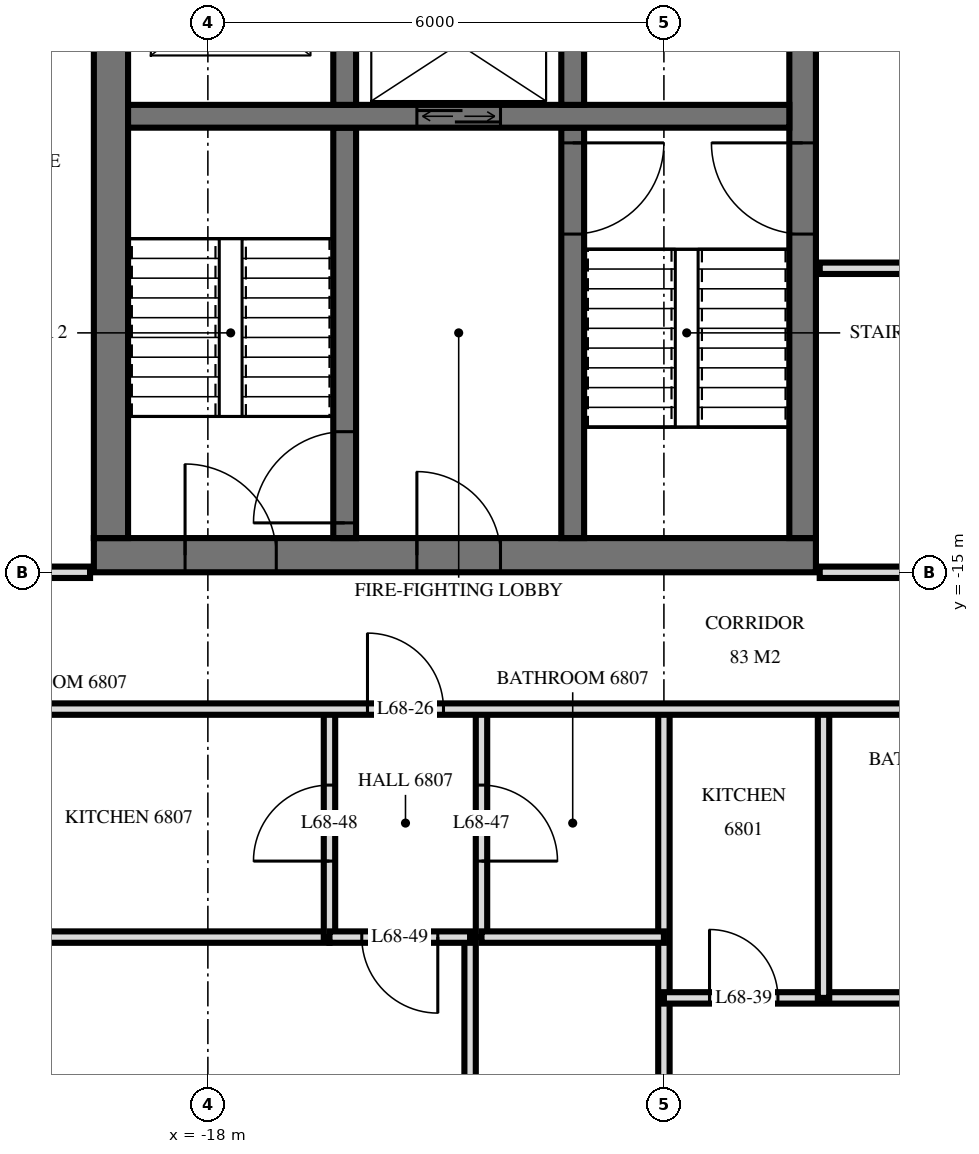
"""IFC4 building model, lengths in metres.
Left out: names, types, materials, properties, quantities, classifications, styles, units other than length and angle.
Written with IfcOpenShell. Run it as: python <this file> out.ifc"""

import sys

from ifc_helpers import new_model, si_unit, direction, frame, frame_2d, origin, place, context, subcontext, project, spatial, rectangle, extrude, element, fill, save


model = new_model("IFC4")
c1 = context("Model", 3, precision=1e-05, world=origin(), true_north=direction((0.0, 1.0)))
c2 = subcontext(c1, "Body", "Model", "MODEL_VIEW")
j1 = project(units=[si_unit("LENGTHUNIT", "METRE"), si_unit("PLANEANGLEUNIT", "RADIAN")], contexts=[c1])
p1 = place(None, origin())
s1 = spatial("IfcSite", under=j1, at=p1, CompositionType="ELEMENT")
p2 = place(p1, origin())
s2 = spatial("IfcBuilding", under=s1, at=p2, CompositionType="ELEMENT")
p3 = place(p2, frame((0.0, 0.0, 259.6)))
s3 = spatial("IfcBuildingStorey", under=s2, at=p3, CompositionType="ELEMENT", Elevation=259.6)
p4 = place(p3, frame((-19.5, -14.775, 0.0), z_axis=(0.0, 0.0, 1.0), x_axis=(1.0, 0.0, 0.0)))
e1 = element("IfcWall", 1, at=p4, inside=s3, PredefinedType="SHEAR", context=c2, shape_type="SweptSolid", body=[
    extrude(rectangle(XDim=9.5, YDim=0.45, at=frame_2d((4.75, 0.0))), origin(), (0.0, 0.0, 1.0), 3.5),
])
p5 = place(p4, frame((1.2, 0.0, 0.0)))
e2 = element("IfcOpeningElement", 2, at=p5, cuts=e1, PredefinedType="OPENING", context=c2, shape_type="SweptSolid", body=[
    extrude(rectangle(XDim=1.2, YDim=2.1, at=frame_2d((0.6, 1.05))), frame((0.0, 0.235, 0.0), z_axis=(0.0, -1.0, 0.0), x_axis=(1.0, 0.0, 0.0)), (0.0, 0.0, 1.0), 0.47),
])
p6 = place(p4, frame((4.25, 0.0, 0.0)))
e3 = element("IfcOpeningElement", 3, at=p6, cuts=e1, PredefinedType="OPENING", context=c2, shape_type="SweptSolid", body=[
    extrude(rectangle(XDim=1.1, YDim=2.1, at=frame_2d((0.55, 1.05))), frame((0.0, 0.235, 0.0), z_axis=(0.0, -1.0, 0.0), x_axis=(1.0, 0.0, 0.0)), (0.0, 0.0, 1.0), 0.47),
])
p7 = place(p3, frame((-10.175, -14.55, 0.0), z_axis=(0.0, 0.0, 1.0), x_axis=(0.0, 1.0, 0.0)))
e4 = element("IfcWall", 4, at=p7, inside=s3, PredefinedType="SHEAR", context=c2, shape_type="SweptSolid", body=[
    extrude(rectangle(XDim=14.1, YDim=0.35, at=frame_2d((7.05, 0.0))), origin(), (0.0, 0.0, 1.0), 3.5),
])
p8 = place(p7, frame((8.4, 0.0, 0.0)))
e5 = element("IfcOpeningElement", 5, at=p8, cuts=e4, PredefinedType="OPENING", context=c2, shape_type="SweptSolid", body=[
    extrude(rectangle(XDim=1.4, YDim=2.4, at=frame_2d((0.7, 1.2))), frame((0.0, 0.185, 0.0), z_axis=(0.0, -1.0, 0.0), x_axis=(1.0, 0.0, 0.0)), (0.0, 0.0, 1.0), 0.37),
])
p9 = place(p7, frame((10.0, 0.0, 0.0)))
e6 = element("IfcOpeningElement", 6, at=p9, cuts=e4, PredefinedType="OPENING", context=c2, shape_type="SweptSolid", body=[
    extrude(rectangle(XDim=1.4, YDim=2.4, at=frame_2d((0.7, 1.2))), frame((0.0, 0.185, 0.0), z_axis=(0.0, -1.0, 0.0), x_axis=(1.0, 0.0, 0.0)), (0.0, 0.0, 1.0), 0.37),
])
p10 = place(p7, frame((4.0, 0.0, 0.0)))
e7 = element("IfcOpeningElement", 7, at=p10, cuts=e4, PredefinedType="OPENING", context=c2, shape_type="SweptSolid", body=[
    extrude(rectangle(XDim=1.2, YDim=2.1, at=frame_2d((0.6, 1.05))), frame((0.0, 0.185, 0.0), z_axis=(0.0, -1.0, 0.0), x_axis=(1.0, 0.0, 0.0)), (0.0, 0.0, 1.0), 0.37),
])
p11 = place(p3, frame((-19.275, -14.55, 0.0), z_axis=(0.0, 0.0, 1.0), x_axis=(0.0, 1.0, 0.0)))
e8 = element("IfcWall", 8, at=p11, inside=s3, PredefinedType="SHEAR", context=c2, shape_type="SweptSolid", body=[
    extrude(rectangle(XDim=14.1, YDim=0.45, at=frame_2d((7.05, 0.0))), origin(), (0.0, 0.0, 1.0), 3.5),
])
p12 = place(p3, frame((-19.05, -9.0, 0.0), z_axis=(0.0, 0.0, 1.0), x_axis=(1.0, 0.0, 0.0)))
e9 = element("IfcWall", 9, at=p12, inside=s3, PredefinedType="SHEAR", context=c2, shape_type="SweptSolid", body=[
    extrude(rectangle(XDim=8.7, YDim=0.3, at=frame_2d((4.35, 0.0))), origin(), (0.0, 0.0, 1.0), 3.5),
])
p13 = place(p12, frame((3.8, 0.0, 0.0)))
e10 = element("IfcOpeningElement", 10, at=p13, cuts=e9, PredefinedType="OPENING", context=c2, shape_type="SweptSolid", body=[
    extrude(rectangle(XDim=1.1, YDim=2.1, at=frame_2d((0.55, 1.05))), frame((0.0, 0.16, 0.0), z_axis=(0.0, -1.0, 0.0), x_axis=(1.0, 0.0, 0.0)), (0.0, 0.0, 1.0), 0.32),
])
p14 = place(p3, frame((-13.2, -8.85, 0.0), z_axis=(0.0, 0.0, 1.0), x_axis=(0.0, 1.0, 0.0)))
e11 = element("IfcWall", 11, at=p14, inside=s3, PredefinedType="SHEAR", context=c2, shape_type="SweptSolid", body=[
    extrude(rectangle(XDim=2.3, YDim=0.3, at=frame_2d((1.15, 0.0))), origin(), (0.0, 0.0, 1.0), 3.5),
])
p15 = place(p3, frame((-13.2, -14.55, 0.0), z_axis=(0.0, 0.0, 1.0), x_axis=(0.0, 1.0, 0.0)))
e12 = element("IfcWall", 12, at=p15, inside=s3, PredefinedType="SHEAR", context=c2, shape_type="SweptSolid", body=[
    extrude(rectangle(XDim=5.4, YDim=0.3, at=frame_2d((2.7, 0.0))), origin(), (0.0, 0.0, 1.0), 3.5),
])
p16 = place(p15, frame((4.0, 0.0, 0.0)))
e13 = element("IfcOpeningElement", 13, at=p16, cuts=e12, PredefinedType="OPENING", context=c2, shape_type="SweptSolid", body=[
    extrude(rectangle(XDim=1.2, YDim=2.1, at=frame_2d((0.6, 1.05))), frame((0.0, 0.16, 0.0), z_axis=(0.0, -1.0, 0.0), x_axis=(1.0, 0.0, 0.0)), (0.0, 0.0, 1.0), 0.32),
])
p17 = place(p3, frame((-16.2, -8.85, 0.0), z_axis=(0.0, 0.0, 1.0), x_axis=(0.0, 1.0, 0.0)))
e14 = element("IfcWall", 14, at=p17, inside=s3, PredefinedType="SHEAR", context=c2, shape_type="SweptSolid", body=[
    extrude(rectangle(XDim=2.3, YDim=0.3, at=frame_2d((1.15, 0.0))), origin(), (0.0, 0.0, 1.0), 3.5),
])
p18 = place(p3, frame((-16.2, -14.55, 0.0), z_axis=(0.0, 0.0, 1.0), x_axis=(0.0, 1.0, 0.0)))
e15 = element("IfcWall", 15, at=p18, inside=s3, PredefinedType="SHEAR", context=c2, shape_type="SweptSolid", body=[
    extrude(rectangle(XDim=5.4, YDim=0.3, at=frame_2d((2.7, 0.0))), origin(), (0.0, 0.0, 1.0), 3.5),
])
p19 = place(p18, frame((0.2, 0.0, 0.0)))
e16 = element("IfcOpeningElement", 16, at=p19, cuts=e15, PredefinedType="OPENING", context=c2, shape_type="SweptSolid", body=[
    extrude(rectangle(XDim=1.2, YDim=2.1, at=frame_2d((0.6, 1.05))), frame((0.0, 0.16, 0.0), z_axis=(0.0, -1.0, 0.0), x_axis=(1.0, 0.0, 0.0)), (0.0, 0.0, 1.0), 0.32),
])
p20 = place(p3, frame((-9.9, -20.6, 0.0), z_axis=(0.0, 0.0, 1.0), x_axis=(0.0, 1.0, 0.0)))
e17 = element("IfcWall", 17, at=p20, inside=s3, PredefinedType="PARTITIONING", context=c2, shape_type="SweptSolid", body=[
    extrude(rectangle(XDim=3.8, YDim=0.15, at=frame_2d((1.9, 0.0))), origin(), (0.0, 0.0, 1.0), 3.22),
])
p21 = place(p3, frame((-12.0, -33.62, 0.0), z_axis=(0.0, 0.0, 1.0), x_axis=(0.0, 1.0, 0.0)))
e18 = element("IfcWall", 18, at=p21, inside=s3, PredefinedType="PARTITIONING", context=c2, shape_type="SweptSolid", body=[
    extrude(rectangle(XDim=16.82, YDim=0.15, at=frame_2d((8.41, 0.0))), origin(), (0.0, 0.0, 1.0), 3.22),
])
p22 = place(p3, frame((-14.4, -19.8, 0.0), z_axis=(0.0, 0.0, 1.0), x_axis=(0.0, 1.0, 0.0)))
e19 = element("IfcWall", 19, at=p22, inside=s3, PredefinedType="PARTITIONING", context=c2, shape_type="SweptSolid", body=[
    extrude(rectangle(XDim=3.0, YDim=0.15, at=frame_2d((1.5, 0.0))), origin(), (0.0, 0.0, 1.0), 3.22),
])
p23 = place(p22, frame((1.0, 0.0, 0.0)))
e20 = element("IfcOpeningElement", 20, at=p23, cuts=e19, PredefinedType="OPENING", context=c2, shape_type="SweptSolid", body=[
    extrude(rectangle(XDim=1.0, YDim=2.1, at=frame_2d((0.5, 1.05))), frame((0.0, 0.085, 0.0), z_axis=(0.0, -1.0, 0.0), x_axis=(1.0, 0.0, 0.0)), (0.0, 0.0, 1.0), 0.17),
])
p24 = place(p3, frame((-14.55, -33.62, 0.0), z_axis=(0.0, 0.0, 1.0), x_axis=(0.0, 1.0, 0.0)))
e21 = element("IfcWall", 21, at=p24, inside=s3, PredefinedType="PARTITIONING", context=c2, shape_type="SweptSolid", body=[
    extrude(rectangle(XDim=13.82, YDim=0.15, at=frame_2d((6.91, 0.0))), origin(), (0.0, 0.0, 1.0), 3.22),
])
p25 = place(p24, frame((6.37, 0.0, 0.0)))
e22 = element("IfcOpeningElement", 22, at=p25, cuts=e21, PredefinedType="OPENING", context=c2, shape_type="SweptSolid", body=[
    extrude(rectangle(XDim=0.9, YDim=2.1, at=frame_2d((0.45, 1.05))), frame((0.0, 0.085, 0.0), z_axis=(0.0, -1.0, 0.0), x_axis=(1.0, 0.0, 0.0)), (0.0, 0.0, 1.0), 0.17),
])
p26 = place(p3, frame((-16.4, -19.8, 0.0), z_axis=(0.0, 0.0, 1.0), x_axis=(0.0, 1.0, 0.0)))
e23 = element("IfcWall", 23, at=p26, inside=s3, PredefinedType="PARTITIONING", context=c2, shape_type="SweptSolid", body=[
    extrude(rectangle(XDim=3.0, YDim=0.15, at=frame_2d((1.5, 0.0))), origin(), (0.0, 0.0, 1.0), 3.22),
])
p27 = place(p26, frame((1.0, 0.0, 0.0)))
e24 = element("IfcOpeningElement", 24, at=p27, cuts=e23, PredefinedType="OPENING", context=c2, shape_type="SweptSolid", body=[
    extrude(rectangle(XDim=1.0, YDim=2.1, at=frame_2d((0.5, 1.05))), frame((0.0, 0.085, 0.0), z_axis=(0.0, -1.0, 0.0), x_axis=(1.0, 0.0, 0.0)), (0.0, 0.0, 1.0), 0.17),
])
p28 = place(p3, frame((-12.0, -20.6, 0.0), z_axis=(0.0, 0.0, 1.0), x_axis=(1.0, 0.0, 0.0)))
e25 = element("IfcWall", 25, at=p28, inside=s3, PredefinedType="PARTITIONING", context=c2, shape_type="SweptSolid", body=[
    extrude(rectangle(XDim=4.5, YDim=0.15, at=frame_2d((2.25, 0.0))), origin(), (0.0, 0.0, 1.0), 3.22),
])
p29 = place(p28, frame((0.6, 0.0, 0.0)))
e26 = element("IfcOpeningElement", 26, at=p29, cuts=e25, PredefinedType="OPENING", context=c2, shape_type="SweptSolid", body=[
    extrude(rectangle(XDim=0.9, YDim=2.1, at=frame_2d((0.45, 1.05))), frame((0.0, 0.085, 0.0), z_axis=(0.0, -1.0, 0.0), x_axis=(1.0, 0.0, 0.0)), (0.0, 0.0, 1.0), 0.17),
])
p30 = place(p3, frame((-16.4, -19.8, 0.0), z_axis=(0.0, 0.0, 1.0), x_axis=(1.0, 0.0, 0.0)))
e27 = element("IfcWall", 27, at=p30, inside=s3, PredefinedType="PARTITIONING", context=c2, shape_type="SweptSolid", body=[
    extrude(rectangle(XDim=1.85, YDim=0.15, at=frame_2d((0.925, 0.0))), origin(), (0.0, 0.0, 1.0), 3.22),
])
p31 = place(p30, frame((0.425, 0.0, 0.0)))
e28 = element("IfcOpeningElement", 28, at=p31, cuts=e27, PredefinedType="OPENING", context=c2, shape_type="SweptSolid", body=[
    extrude(rectangle(XDim=1.0, YDim=2.1, at=frame_2d((0.5, 1.05))), frame((0.0, 0.085, 0.0), z_axis=(0.0, -1.0, 0.0), x_axis=(1.0, 0.0, 0.0)), (0.0, 0.0, 1.0), 0.17),
])
p32 = place(p3, frame((-20.55, -19.8, 0.0), z_axis=(0.0, 0.0, 1.0), x_axis=(1.0, 0.0, 0.0)))
e29 = element("IfcWall", 29, at=p32, inside=s3, PredefinedType="PARTITIONING", context=c2, shape_type="SweptSolid", body=[
    extrude(rectangle(XDim=4.15, YDim=0.15, at=frame_2d((2.075, 0.0))), origin(), (0.0, 0.0, 1.0), 3.22),
])
p33 = place(p3, frame((-14.4, -19.8, 0.0), z_axis=(0.0, 0.0, 1.0), x_axis=(1.0, 0.0, 0.0)))
e30 = element("IfcWall", 30, at=p33, inside=s3, PredefinedType="PARTITIONING", context=c2, shape_type="SweptSolid", body=[
    extrude(rectangle(XDim=2.4, YDim=0.15, at=frame_2d((1.2, 0.0))), origin(), (0.0, 0.0, 1.0), 3.22),
])
p34 = place(p3, frame((-22.92, -16.8, 0.0), z_axis=(0.0, 0.0, 1.0), x_axis=(1.0, 0.0, 0.0)))
e31 = element("IfcWall", 31, at=p34, inside=s3, PredefinedType="PARTITIONING", context=c2, shape_type="SweptSolid", body=[
    extrude(rectangle(XDim=45.84, YDim=0.15, at=frame_2d((22.92, 0.0))), origin(), (0.0, 0.0, 1.0), 3.22),
])
p35 = place(p34, frame((15.67, 0.0, 0.0)))
e32 = element("IfcOpeningElement", 32, at=p35, cuts=e31, PredefinedType="OPENING", context=c2, shape_type="SweptSolid", body=[
    extrude(rectangle(XDim=1.0, YDim=2.1, at=frame_2d((0.5, 1.05))), frame((0.0, 0.085, 0.0), z_axis=(0.0, -1.0, 0.0), x_axis=(1.0, 0.0, 0.0)), (0.0, 0.0, 1.0), 0.17),
])
p36 = place(p34, frame((18.77, 0.0, 0.0)))
e33 = element("IfcOpeningElement", 33, at=p36, cuts=e31, PredefinedType="OPENING", context=c2, shape_type="SweptSolid", body=[
    extrude(rectangle(XDim=1.0, YDim=2.1, at=frame_2d((0.5, 1.05))), frame((0.0, 0.085, 0.0), z_axis=(0.0, -1.0, 0.0), x_axis=(1.0, 0.0, 0.0)), (0.0, 0.0, 1.0), 0.17),
])
p37 = place(p34, frame((20.07, 0.0, 0.0)))
e34 = element("IfcOpeningElement", 34, at=p37, cuts=e31, PredefinedType="OPENING", context=c2, shape_type="SweptSolid", body=[
    extrude(rectangle(XDim=1.0, YDim=2.1, at=frame_2d((0.5, 1.05))), frame((0.0, 0.085, 0.0), z_axis=(0.0, -1.0, 0.0), x_axis=(1.0, 0.0, 0.0)), (0.0, 0.0, 1.0), 0.17),
])
p38 = place(p34, frame((24.77, 0.0, 0.0)))
e35 = element("IfcOpeningElement", 35, at=p38, cuts=e31, PredefinedType="OPENING", context=c2, shape_type="SweptSolid", body=[
    extrude(rectangle(XDim=1.0, YDim=2.1, at=frame_2d((0.5, 1.05))), frame((0.0, 0.085, 0.0), z_axis=(0.0, -1.0, 0.0), x_axis=(1.0, 0.0, 0.0)), (0.0, 0.0, 1.0), 0.17),
])
p39 = place(p34, frame((26.07, 0.0, 0.0)))
e36 = element("IfcOpeningElement", 36, at=p39, cuts=e31, PredefinedType="OPENING", context=c2, shape_type="SweptSolid", body=[
    extrude(rectangle(XDim=1.0, YDim=2.1, at=frame_2d((0.5, 1.05))), frame((0.0, 0.085, 0.0), z_axis=(0.0, -1.0, 0.0), x_axis=(1.0, 0.0, 0.0)), (0.0, 0.0, 1.0), 0.17),
])
p40 = place(p34, frame((30.77, 0.0, 0.0)))
e37 = element("IfcOpeningElement", 37, at=p40, cuts=e31, PredefinedType="OPENING", context=c2, shape_type="SweptSolid", body=[
    extrude(rectangle(XDim=1.0, YDim=2.1, at=frame_2d((0.5, 1.05))), frame((0.0, 0.085, 0.0), z_axis=(0.0, -1.0, 0.0), x_axis=(1.0, 0.0, 0.0)), (0.0, 0.0, 1.0), 0.17),
])
p41 = place(p34, frame((7.02, 0.0, 0.0)))
e38 = element("IfcOpeningElement", 38, at=p41, cuts=e31, PredefinedType="OPENING", context=c2, shape_type="SweptSolid", body=[
    extrude(rectangle(XDim=1.0, YDim=2.1, at=frame_2d((0.5, 1.05))), frame((0.0, 0.085, 0.0), z_axis=(0.0, -1.0, 0.0), x_axis=(1.0, 0.0, 0.0)), (0.0, 0.0, 1.0), 0.17),
])
p42 = place(p34, frame((38.42, 0.0, 0.0)))
e39 = element("IfcOpeningElement", 39, at=p42, cuts=e31, PredefinedType="OPENING", context=c2, shape_type="SweptSolid", body=[
    extrude(rectangle(XDim=1.0, YDim=2.1, at=frame_2d((0.5, 1.05))), frame((0.0, 0.085, 0.0), z_axis=(0.0, -1.0, 0.0), x_axis=(1.0, 0.0, 0.0)), (0.0, 0.0, 1.0), 0.17),
])
p43 = place(p34, frame((43.69, 0.0, 0.0)))
e40 = element("IfcOpeningElement", 40, at=p43, cuts=e31, PredefinedType="OPENING", context=c2, shape_type="SweptSolid", body=[
    extrude(rectangle(XDim=1.0, YDim=2.1, at=frame_2d((0.5, 1.05))), frame((0.0, 0.085, 0.0), z_axis=(0.0, -1.0, 0.0), x_axis=(1.0, 0.0, 0.0)), (0.0, 0.0, 1.0), 0.17),
])
p44 = place(p3, frame((-22.92, -15.0, 0.0), z_axis=(0.0, 0.0, 1.0), x_axis=(1.0, 0.0, 0.0)))
e41 = element("IfcWall", 41, at=p44, inside=s3, PredefinedType="PARTITIONING", context=c2, shape_type="SweptSolid", body=[
    extrude(rectangle(XDim=3.37, YDim=0.15, at=frame_2d((1.685, 0.0))), origin(), (0.0, 0.0, 1.0), 3.22),
])
p45 = place(p44, frame((1.47, 0.0, 0.0)))
e42 = element("IfcOpeningElement", 42, at=p45, cuts=e41, PredefinedType="OPENING", context=c2, shape_type="SweptSolid", body=[
    extrude(rectangle(XDim=1.0, YDim=2.1, at=frame_2d((0.5, 1.05))), frame((0.0, 0.085, 0.0), z_axis=(0.0, -1.0, 0.0), x_axis=(1.0, 0.0, 0.0)), (0.0, 0.0, 1.0), 0.17),
])
p46 = place(p3, frame((-9.95, -15.0, 0.0), z_axis=(0.0, 0.0, 1.0), x_axis=(1.0, 0.0, 0.0)))
e43 = element("IfcWall", 43, at=p46, inside=s3, PredefinedType="PARTITIONING", context=c2, shape_type="SweptSolid", body=[
    extrude(rectangle(XDim=19.9, YDim=0.15, at=frame_2d((9.95, 0.0))), origin(), (0.0, 0.0, 1.0), 2.584),
])
p47 = place(p46, frame((9.45, 0.0, 0.0)))
e44 = element("IfcOpeningElement", 44, at=p47, cuts=e43, PredefinedType="OPENING", context=c2, shape_type="SweptSolid", body=[
    extrude(rectangle(XDim=1.0, YDim=2.1, at=frame_2d((0.5, 1.05))), frame((0.0, 0.085, 0.0), z_axis=(0.0, -1.0, 0.0), x_axis=(1.0, 0.0, 0.0)), (0.0, 0.0, 1.0), 0.17),
])
p48 = place(p3, frame((-9.95, -11.0, 0.0), z_axis=(0.0, 0.0, 1.0), x_axis=(1.0, 0.0, 0.0)))
e45 = element("IfcWall", 45, at=p48, inside=s3, PredefinedType="PARTITIONING", context=c2, shape_type="SweptSolid", body=[
    extrude(rectangle(XDim=19.9, YDim=0.15, at=frame_2d((9.95, 0.0))), origin(), (0.0, 0.0, 1.0), 3.22),
])
p49 = place(p48, frame((9.45, 0.0, 0.0)))
e46 = element("IfcOpeningElement", 46, at=p49, cuts=e45, PredefinedType="OPENING", context=c2, shape_type="SweptSolid", body=[
    extrude(rectangle(XDim=1.0, YDim=2.1, at=frame_2d((0.5, 1.05))), frame((0.0, 0.085, 0.0), z_axis=(0.0, -1.0, 0.0), x_axis=(1.0, 0.0, 0.0)), (0.0, 0.0, 1.0), 0.17),
])
p50 = place(p48, frame((15.45, 0.0, 0.0)))
e47 = element("IfcOpeningElement", 47, at=p50, cuts=e45, PredefinedType="OPENING", context=c2, shape_type="SweptSolid", body=[
    extrude(rectangle(XDim=1.0, YDim=2.1, at=frame_2d((0.5, 1.05))), frame((0.0, 0.085, 0.0), z_axis=(0.0, -1.0, 0.0), x_axis=(1.0, 0.0, 0.0)), (0.0, 0.0, 1.0), 0.17),
])
p51 = place(p13, origin())
e48 = element("IfcDoor", 48, at=p51, inside=s3, OperationType="DOUBLE_DOOR_SLIDING", PredefinedType="USERDEFINED", context=c2, shape_type="SweptSolid", body=[
    extrude(rectangle(XDim=1.1, YDim=2.1, at=frame_2d((0.55, 1.05))), frame((0.0, 0.025, 0.0), z_axis=(0.0, -1.0, 0.0), x_axis=(1.0, 0.0, 0.0)), (0.0, 0.0, 1.0), 0.05),
])
fill(e10, e48)
p52 = place(p10, origin())
e49 = element("IfcDoor", 49, at=p52, inside=s3, OperationType="SINGLE_SWING_LEFT", PredefinedType="DOOR", context=c2, shape_type="SweptSolid", body=[
    extrude(rectangle(XDim=1.2, YDim=2.1, at=frame_2d((0.6, 1.05))), frame((0.0, 0.025, 0.0), z_axis=(0.0, -1.0, 0.0), x_axis=(1.0, 0.0, 0.0)), (0.0, 0.0, 1.0), 0.05),
])
fill(e7, e49)
p53 = place(p5, origin())
e50 = element("IfcDoor", 50, at=p53, inside=s3, OperationType="SINGLE_SWING_RIGHT", PredefinedType="DOOR", context=c2, shape_type="SweptSolid", body=[
    extrude(rectangle(XDim=1.2, YDim=2.1, at=frame_2d((0.6, 1.05))), frame((0.0, 0.025, 0.0), z_axis=(0.0, -1.0, 0.0), x_axis=(1.0, 0.0, 0.0)), (0.0, 0.0, 1.0), 0.05),
])
fill(e2, e50)
p54 = place(p6, origin())
e51 = element("IfcDoor", 51, at=p54, inside=s3, OperationType="SINGLE_SWING_RIGHT", PredefinedType="DOOR", context=c2, shape_type="SweptSolid", body=[
    extrude(rectangle(XDim=1.1, YDim=2.1, at=frame_2d((0.55, 1.05))), frame((0.0, 0.025, 0.0), z_axis=(0.0, -1.0, 0.0), x_axis=(1.0, 0.0, 0.0)), (0.0, 0.0, 1.0), 0.05),
])
fill(e3, e51)
p55 = place(p16, frame((0.6, 0.0, 0.0), z_axis=(0.0, 0.0, 1.0), x_axis=(-1.0, 0.0, 0.0)))
e52 = element("IfcDoor", 52, at=p55, inside=s3, OperationType="SINGLE_SWING_RIGHT", PredefinedType="DOOR", context=c2, shape_type="SweptSolid", body=[
    extrude(rectangle(XDim=1.2, YDim=2.1, at=frame_2d((0.0, 1.05))), frame((0.0, -0.025, 0.0), z_axis=(0.0, 1.0, 0.0), x_axis=(-1.0, 0.0, 0.0)), (0.0, 0.0, 1.0), 0.05),
])
fill(e13, e52)
p56 = place(p19, origin())
e53 = element("IfcDoor", 53, at=p56, inside=s3, OperationType="SINGLE_SWING_RIGHT", PredefinedType="DOOR", context=c2, shape_type="SweptSolid", body=[
    extrude(rectangle(XDim=1.2, YDim=2.1, at=frame_2d((0.6, 1.05))), frame((0.0, 0.025, 0.0), z_axis=(0.0, -1.0, 0.0), x_axis=(1.0, 0.0, 0.0)), (0.0, 0.0, 1.0), 0.05),
])
fill(e16, e53)
p57 = place(p41, origin())
e54 = element("IfcDoor", 54, at=p57, inside=s3, OperationType="SINGLE_SWING_RIGHT", PredefinedType="DOOR", context=c2, shape_type="SweptSolid", body=[
    extrude(rectangle(XDim=1.0, YDim=2.1, at=frame_2d((0.5, 1.05))), frame((0.0, 0.025, 0.0), z_axis=(0.0, -1.0, 0.0), x_axis=(1.0, 0.0, 0.0)), (0.0, 0.0, 1.0), 0.05),
])
fill(e38, e54)
p58 = place(p29, origin())
e55 = element("IfcDoor", 55, at=p58, inside=s3, OperationType="SINGLE_SWING_RIGHT", PredefinedType="DOOR", context=c2, shape_type="SweptSolid", body=[
    extrude(rectangle(XDim=0.9, YDim=2.1, at=frame_2d((0.45, 1.05))), frame((0.0, 0.025, 0.0), z_axis=(0.0, -1.0, 0.0), x_axis=(1.0, 0.0, 0.0)), (0.0, 0.0, 1.0), 0.05),
])
fill(e26, e55)
p59 = place(p23, frame((0.5, 0.0, 0.0), z_axis=(0.0, 0.0, 1.0), x_axis=(-1.0, 0.0, 0.0)))
e56 = element("IfcDoor", 56, at=p59, inside=s3, OperationType="SINGLE_SWING_LEFT", PredefinedType="DOOR", context=c2, shape_type="SweptSolid", body=[
    extrude(rectangle(XDim=1.0, YDim=2.1, at=frame_2d((0.0, 1.05))), frame((0.0, -0.025, 0.0), z_axis=(0.0, 1.0, 0.0), x_axis=(-1.0, 0.0, 0.0)), (0.0, 0.0, 1.0), 0.05),
])
fill(e20, e56)
p60 = place(p27, origin())
e57 = element("IfcDoor", 57, at=p60, inside=s3, OperationType="SINGLE_SWING_RIGHT", PredefinedType="DOOR", context=c2, shape_type="SweptSolid", body=[
    extrude(rectangle(XDim=1.0, YDim=2.1, at=frame_2d((0.5, 1.05))), frame((0.0, 0.025, 0.0), z_axis=(0.0, -1.0, 0.0), x_axis=(1.0, 0.0, 0.0)), (0.0, 0.0, 1.0), 0.05),
])
fill(e24, e57)
p61 = place(p31, frame((0.5, 0.0, 0.0), z_axis=(0.0, 0.0, 1.0), x_axis=(-1.0, 0.0, 0.0)))
e58 = element("IfcDoor", 58, at=p61, inside=s3, OperationType="SINGLE_SWING_RIGHT", PredefinedType="DOOR", context=c2, shape_type="SweptSolid", body=[
    extrude(rectangle(XDim=1.0, YDim=2.1, at=frame_2d((0.0, 1.05))), frame((0.0, -0.025, 0.0), z_axis=(0.0, 1.0, 0.0), x_axis=(-1.0, 0.0, 0.0)), (0.0, 0.0, 1.0), 0.05),
])
fill(e28, e58)
save(model, sys.argv[1])
